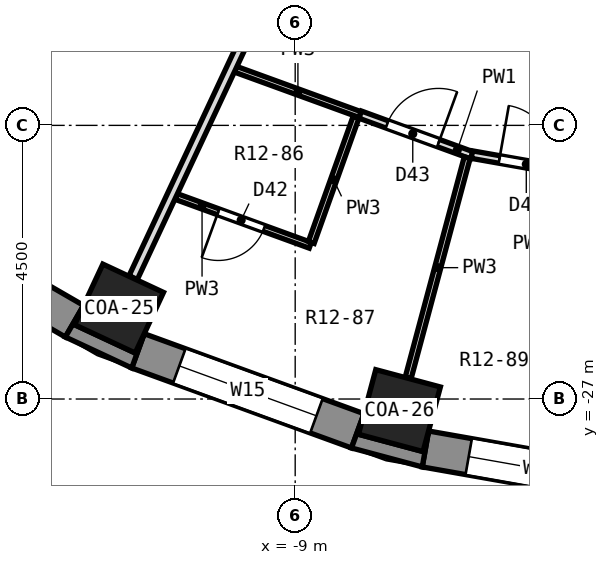
"""IFC4 building model, lengths in metres.
Left out: names, types, materials, properties, quantities, classifications, styles, units other than length and angle.
Written with IfcOpenShell. Run it as: python <this file> out.ifc"""

import sys

from ifc_helpers import new_model, si_unit, direction, frame, frame_2d, origin, origin_2d, place, context, subcontext, project, spatial, polyline, rectangle, outline, extrude, element, fill, save


model = new_model("IFC4")
c1 = context("Model", 3, precision=1e-05, world=origin(), true_north=direction((0.0, 1.0)))
c2 = subcontext(c1, "Body", "Model", "MODEL_VIEW")
j1 = project(units=[si_unit("LENGTHUNIT", "METRE"), si_unit("PLANEANGLEUNIT", "RADIAN")], contexts=[c1])
p1 = place(None, origin())
s1 = spatial("IfcSite", under=j1, at=p1, CompositionType="ELEMENT")
p2 = place(p1, origin())
s2 = spatial("IfcBuilding", under=s1, at=p2, CompositionType="ELEMENT")
p3 = place(p2, frame((0.0, 0.0, 56.0)))
s3 = spatial("IfcBuildingStorey", under=s2, at=p3, CompositionType="ELEMENT", Elevation=56.0)
for number, where, z_axis, x_axis in (
    (1, (-11.897, -25.512, 0.0), (0.0, 0.0, 1.0), (-0.423, -0.906, 0.0)),
    (2, (-7.286, -27.191, 0.0), (0.0, 0.0, 1.0), (-0.259, -0.966, 0.0)),
):
    element("IfcColumn", number, at=place(p3, frame(where, z_axis=z_axis, x_axis=x_axis)), inside=s3, PredefinedType="COLUMN", context=c2, shape_type="SweptSolid", body=[
        extrude(rectangle(XDim=1.1, YDim=1.1, at=origin_2d()), origin(), (0.0, 0.0, 1.0), 3.3),
    ])
p4 = place(p3, frame((-15.96, -23.798, 0.0), z_axis=(0.0, 0.0, 1.0), x_axis=(0.86603124159, -0.499989888488, 0.0)))
e3 = element("IfcWall", 3, at=p4, inside=s3, PredefinedType="SOLIDWALL", context=c2, shape_type="SweptSolid", body=[
    extrude(rectangle(XDim=3.846, YDim=0.6, at=frame_2d((1.923, 0.0))), origin(), (0.0, 0.0, 1.0), 2.75),
])
p5 = place(p4, frame((0.723, 0.0, 0.9)))
e4 = element("IfcOpeningElement", 4, at=p5, cuts=e3, PredefinedType="OPENING", context=c2, shape_type="SweptSolid", body=[
    extrude(rectangle(XDim=2.4, YDim=1.8, at=frame_2d((1.2, 0.9))), frame((0.0, 0.312, 0.0), z_axis=(0.0, -1.0, 0.0), x_axis=(1.0, 0.0, 0.0)), (0.0, 0.0, 1.0), 0.624),
])
p6 = place(p3, frame((-11.585, -26.208, 0.0), z_axis=(0.0, 0.0, 1.0), x_axis=(0.939689588564, -0.342028474173, 0.0)))
e5 = element("IfcWall", 5, at=p6, inside=s3, PredefinedType="SOLIDWALL", context=c2, shape_type="SweptSolid", body=[
    extrude(rectangle(XDim=3.846, YDim=0.6, at=frame_2d((1.923, 0.0))), origin(), (0.0, 0.0, 1.0), 2.75),
])
p7 = place(p6, frame((0.723, 0.0, 0.9)))
e6 = element("IfcOpeningElement", 6, at=p7, cuts=e5, PredefinedType="OPENING", context=c2, shape_type="SweptSolid", body=[
    extrude(rectangle(XDim=2.4, YDim=1.8, at=frame_2d((1.2, 0.9))), frame((0.0, 0.312, 0.0), z_axis=(0.0, -1.0, 0.0), x_axis=(1.0, 0.0, 0.0)), (0.0, 0.0, 1.0), 0.624),
])
p8 = place(p3, frame((-6.858, -27.821, 0.0), z_axis=(0.0, 0.0, 1.0), x_axis=(0.984800809218, -0.173687553279, 0.0)))
e7 = element("IfcWall", 7, at=p8, inside=s3, PredefinedType="SOLIDWALL", context=c2, shape_type="SweptSolid", body=[
    extrude(rectangle(XDim=3.846, YDim=0.6, at=frame_2d((1.923, 0.0))), origin(), (0.0, 0.0, 1.0), 2.75),
])
p9 = place(p8, frame((0.723, 0.0, 0.9)))
e8 = element("IfcOpeningElement", 8, at=p9, cuts=e7, PredefinedType="OPENING", context=c2, shape_type="SweptSolid", body=[
    extrude(rectangle(XDim=2.4, YDim=1.8, at=frame_2d((1.2, 0.9))), frame((0.0, 0.312, 0.0), z_axis=(0.0, -1.0, 0.0), x_axis=(1.0, 0.0, 0.0)), (0.0, 0.0, 1.0), 0.624),
])
p10 = place(p3, origin())
e9 = element("IfcWall", 9, at=p10, inside=s3, PredefinedType="SOLIDWALL", context=c2, shape_type="SweptSolid", body=[
    extrude(outline(polyline([(-11.688, -26.49), (-11.483, -25.926), (-11.631, -26.243), (-12.628, -25.779), (-12.479, -25.461), (-12.78, -25.981), (-11.688, -26.49)])), origin(), (0.0, 0.0, 1.0), 2.75),
])
p11 = place(p3, origin())
e10 = element("IfcWall", 10, at=p11, inside=s3, PredefinedType="SOLIDWALL", context=c2, shape_type="SweptSolid", body=[
    extrude(outline(polyline([(-6.91, -28.117), (-6.806, -27.526), (-6.897, -27.865), (-7.959, -27.58), (-7.869, -27.241), (-8.074, -27.805), (-6.91, -28.117)])), origin(), (0.0, 0.0, 1.0), 2.75),
])
p12 = place(p3, frame((-10.955, -23.671, 0.0), z_axis=(0.0, 0.0, 1.0), x_axis=(0.939750838969, -0.341860147805, 0.0)))
e11 = element("IfcWall", 11, at=p12, inside=s3, PredefinedType="PARTITIONING", context=c2, shape_type="SweptSolid", body=[
    extrude(rectangle(XDim=2.344, YDim=0.1, at=frame_2d((1.172, 0.0))), origin(), (0.0, 0.0, 1.0), 2.75),
])
p13 = place(p12, frame((0.734, 0.0, 0.0)))
e12 = element("IfcOpeningElement", 12, at=p13, cuts=e11, PredefinedType="OPENING", context=c2, shape_type="SweptSolid", body=[
    extrude(rectangle(XDim=0.8, YDim=2.1, at=frame_2d((0.4, 1.05))), frame((0.0, 0.062, 0.0), z_axis=(0.0, -1.0, 0.0), x_axis=(1.0, 0.0, 0.0)), (0.0, 0.0, 1.0), 0.124),
])
p14 = place(p3, frame((-9.979, -21.578, 0.0), z_axis=(0.0, 0.0, 1.0), x_axis=(0.939731280586, -0.341913907714, 0.0)))
e13 = element("IfcWall", 13, at=p14, inside=s3, PredefinedType="PARTITIONING", context=c2, shape_type="SweptSolid", body=[
    extrude(rectangle(XDim=2.18, YDim=0.1, at=frame_2d((1.09, 0.0))), origin(), (0.0, 0.0, 1.0), 2.75),
])
p15 = place(p3, frame((-7.931, -22.323, 0.0), z_axis=(0.0, 0.0, 1.0), x_axis=(0.9395852567, -0.342314979795, 0.0)))
e14 = element("IfcWall", 14, at=p15, inside=s3, PredefinedType="PARTITIONING", context=c2, shape_type="SweptSolid", body=[
    extrude(rectangle(XDim=1.953, YDim=0.125, at=frame_2d((0.977, 0.0))), origin(), (0.0, 0.0, 1.0), 2.75),
])
p16 = place(p15, frame((0.47, 0.0, 0.0)))
e15 = element("IfcOpeningElement", 15, at=p16, cuts=e14, PredefinedType="OPENING", context=c2, shape_type="SweptSolid", body=[
    extrude(rectangle(XDim=0.9, YDim=2.1, at=frame_2d((0.45, 1.05))), frame((0.0, 0.074, 0.0), z_axis=(0.0, -1.0, 0.0), x_axis=(1.0, 0.0, 0.0)), (0.0, 0.0, 1.0), 0.149),
])
p17 = place(p3, frame((-6.094, -22.981, 0.0), z_axis=(0.0, 0.0, 1.0), x_axis=(0.984813123205, -0.173617719035, 0.0)))
e16 = element("IfcWall", 16, at=p17, inside=s3, PredefinedType="PARTITIONING", context=c2, shape_type="SweptSolid", body=[
    extrude(rectangle(XDim=1.828, YDim=0.125, at=frame_2d((0.914, 0.0))), origin(), (0.0, 0.0, 1.0), 2.75),
])
p18 = place(p17, frame((0.458, 0.0, 0.0)))
e17 = element("IfcOpeningElement", 17, at=p18, cuts=e16, PredefinedType="OPENING", context=c2, shape_type="SweptSolid", body=[
    extrude(rectangle(XDim=0.9, YDim=2.1, at=frame_2d((0.45, 1.05))), frame((0.0, 0.074, 0.0), z_axis=(0.0, -1.0, 0.0), x_axis=(1.0, 0.0, 0.0)), (0.0, 0.0, 1.0), 0.149),
])
p19 = place(p3, frame((-11.664, -25.003, 0.0), z_axis=(0.0, 0.0, 1.0), x_axis=(0.423588806437, 0.905854581631, 0.0)))
e18 = element("IfcWall", 18, at=p19, inside=s3, PredefinedType="PARTITIONING", context=c2, shape_type="SweptSolid", body=[
    extrude(rectangle(XDim=8.455, YDim=0.15, at=frame_2d((4.227, 0.0))), origin(), (0.0, 0.0, 1.0), 2.75),
])
p20 = place(p3, frame((-8.735, -24.425, 0.0), z_axis=(0.0, 0.0, 1.0), x_axis=(0.336477788464, 0.941691402674, 0.0)))
e19 = element("IfcWall", 19, at=p20, inside=s3, PredefinedType="PARTITIONING", context=c2, shape_type="SweptSolid", body=[
    extrude(rectangle(XDim=2.188, YDim=0.1, at=frame_2d((1.094, 0.0))), origin(), (0.0, 0.0, 1.0), 2.75),
])
p21 = place(p3, frame((-7.141, -26.65, 0.0), z_axis=(0.0, 0.0, 1.0), x_axis=(0.258842464283, 0.965919550834, 0.0)))
e20 = element("IfcWall", 20, at=p21, inside=s3, PredefinedType="PARTITIONING", context=c2, shape_type="SweptSolid", body=[
    extrude(rectangle(XDim=3.747, YDim=0.1, at=frame_2d((1.874, 0.0))), origin(), (0.0, 0.0, 1.0), 2.75),
])
p22 = place(p7, origin())
e21 = element("IfcWindow", 21, at=p22, inside=s3, PartitioningType="SINGLE_PANEL", PredefinedType="WINDOW", context=c2, shape_type="SweptSolid", body=[
    extrude(rectangle(XDim=2.4, YDim=1.8, at=frame_2d((1.2, 0.9))), frame((0.0, 0.18, 0.0), z_axis=(0.0, -1.0, 0.0), x_axis=(1.0, 0.0, 0.0)), (0.0, 0.0, 1.0), 0.06),
])
fill(e6, e21)
p23 = place(p9, origin())
e22 = element("IfcWindow", 22, at=p23, inside=s3, PartitioningType="SINGLE_PANEL", PredefinedType="WINDOW", context=c2, shape_type="SweptSolid", body=[
    extrude(rectangle(XDim=2.4, YDim=1.8, at=frame_2d((1.2, 0.9))), frame((0.0, 0.18, 0.0), z_axis=(0.0, -1.0, 0.0), x_axis=(1.0, 0.0, 0.0)), (0.0, 0.0, 1.0), 0.06),
])
fill(e8, e22)
p24 = place(p13, frame((0.8, 0.0, 0.0), z_axis=(0.0, 0.0, 1.0), x_axis=(-1.0, 0.0, 0.0)))
e23 = element("IfcDoor", 23, at=p24, inside=s3, OperationType="SINGLE_SWING_RIGHT", PredefinedType="DOOR", context=c2, shape_type="SweptSolid", body=[
    extrude(rectangle(XDim=0.8, YDim=2.1, at=frame_2d((0.4, 1.05))), frame((0.0, 0.025, 0.0), z_axis=(0.0, -1.0, 0.0), x_axis=(1.0, 0.0, 0.0)), (0.0, 0.0, 1.0), 0.05),
])
fill(e12, e23)
p25 = place(p16, origin())
e24 = element("IfcDoor", 24, at=p25, inside=s3, OperationType="SINGLE_SWING_RIGHT", PredefinedType="DOOR", context=c2, shape_type="SweptSolid", body=[
    extrude(rectangle(XDim=0.9, YDim=2.1, at=frame_2d((0.45, 1.05))), frame((0.0, 0.025, 0.0), z_axis=(0.0, -1.0, 0.0), x_axis=(1.0, 0.0, 0.0)), (0.0, 0.0, 1.0), 0.05),
])
fill(e15, e24)
p26 = place(p18, origin())
e25 = element("IfcDoor", 25, at=p26, inside=s3, OperationType="SINGLE_SWING_LEFT", PredefinedType="DOOR", context=c2, shape_type="SweptSolid", body=[
    extrude(rectangle(XDim=0.9, YDim=2.1, at=frame_2d((0.45, 1.05))), frame((0.0, 0.025, 0.0), z_axis=(0.0, -1.0, 0.0), x_axis=(1.0, 0.0, 0.0)), (0.0, 0.0, 1.0), 0.05),
])
fill(e17, e25)
save(model, sys.argv[1])
